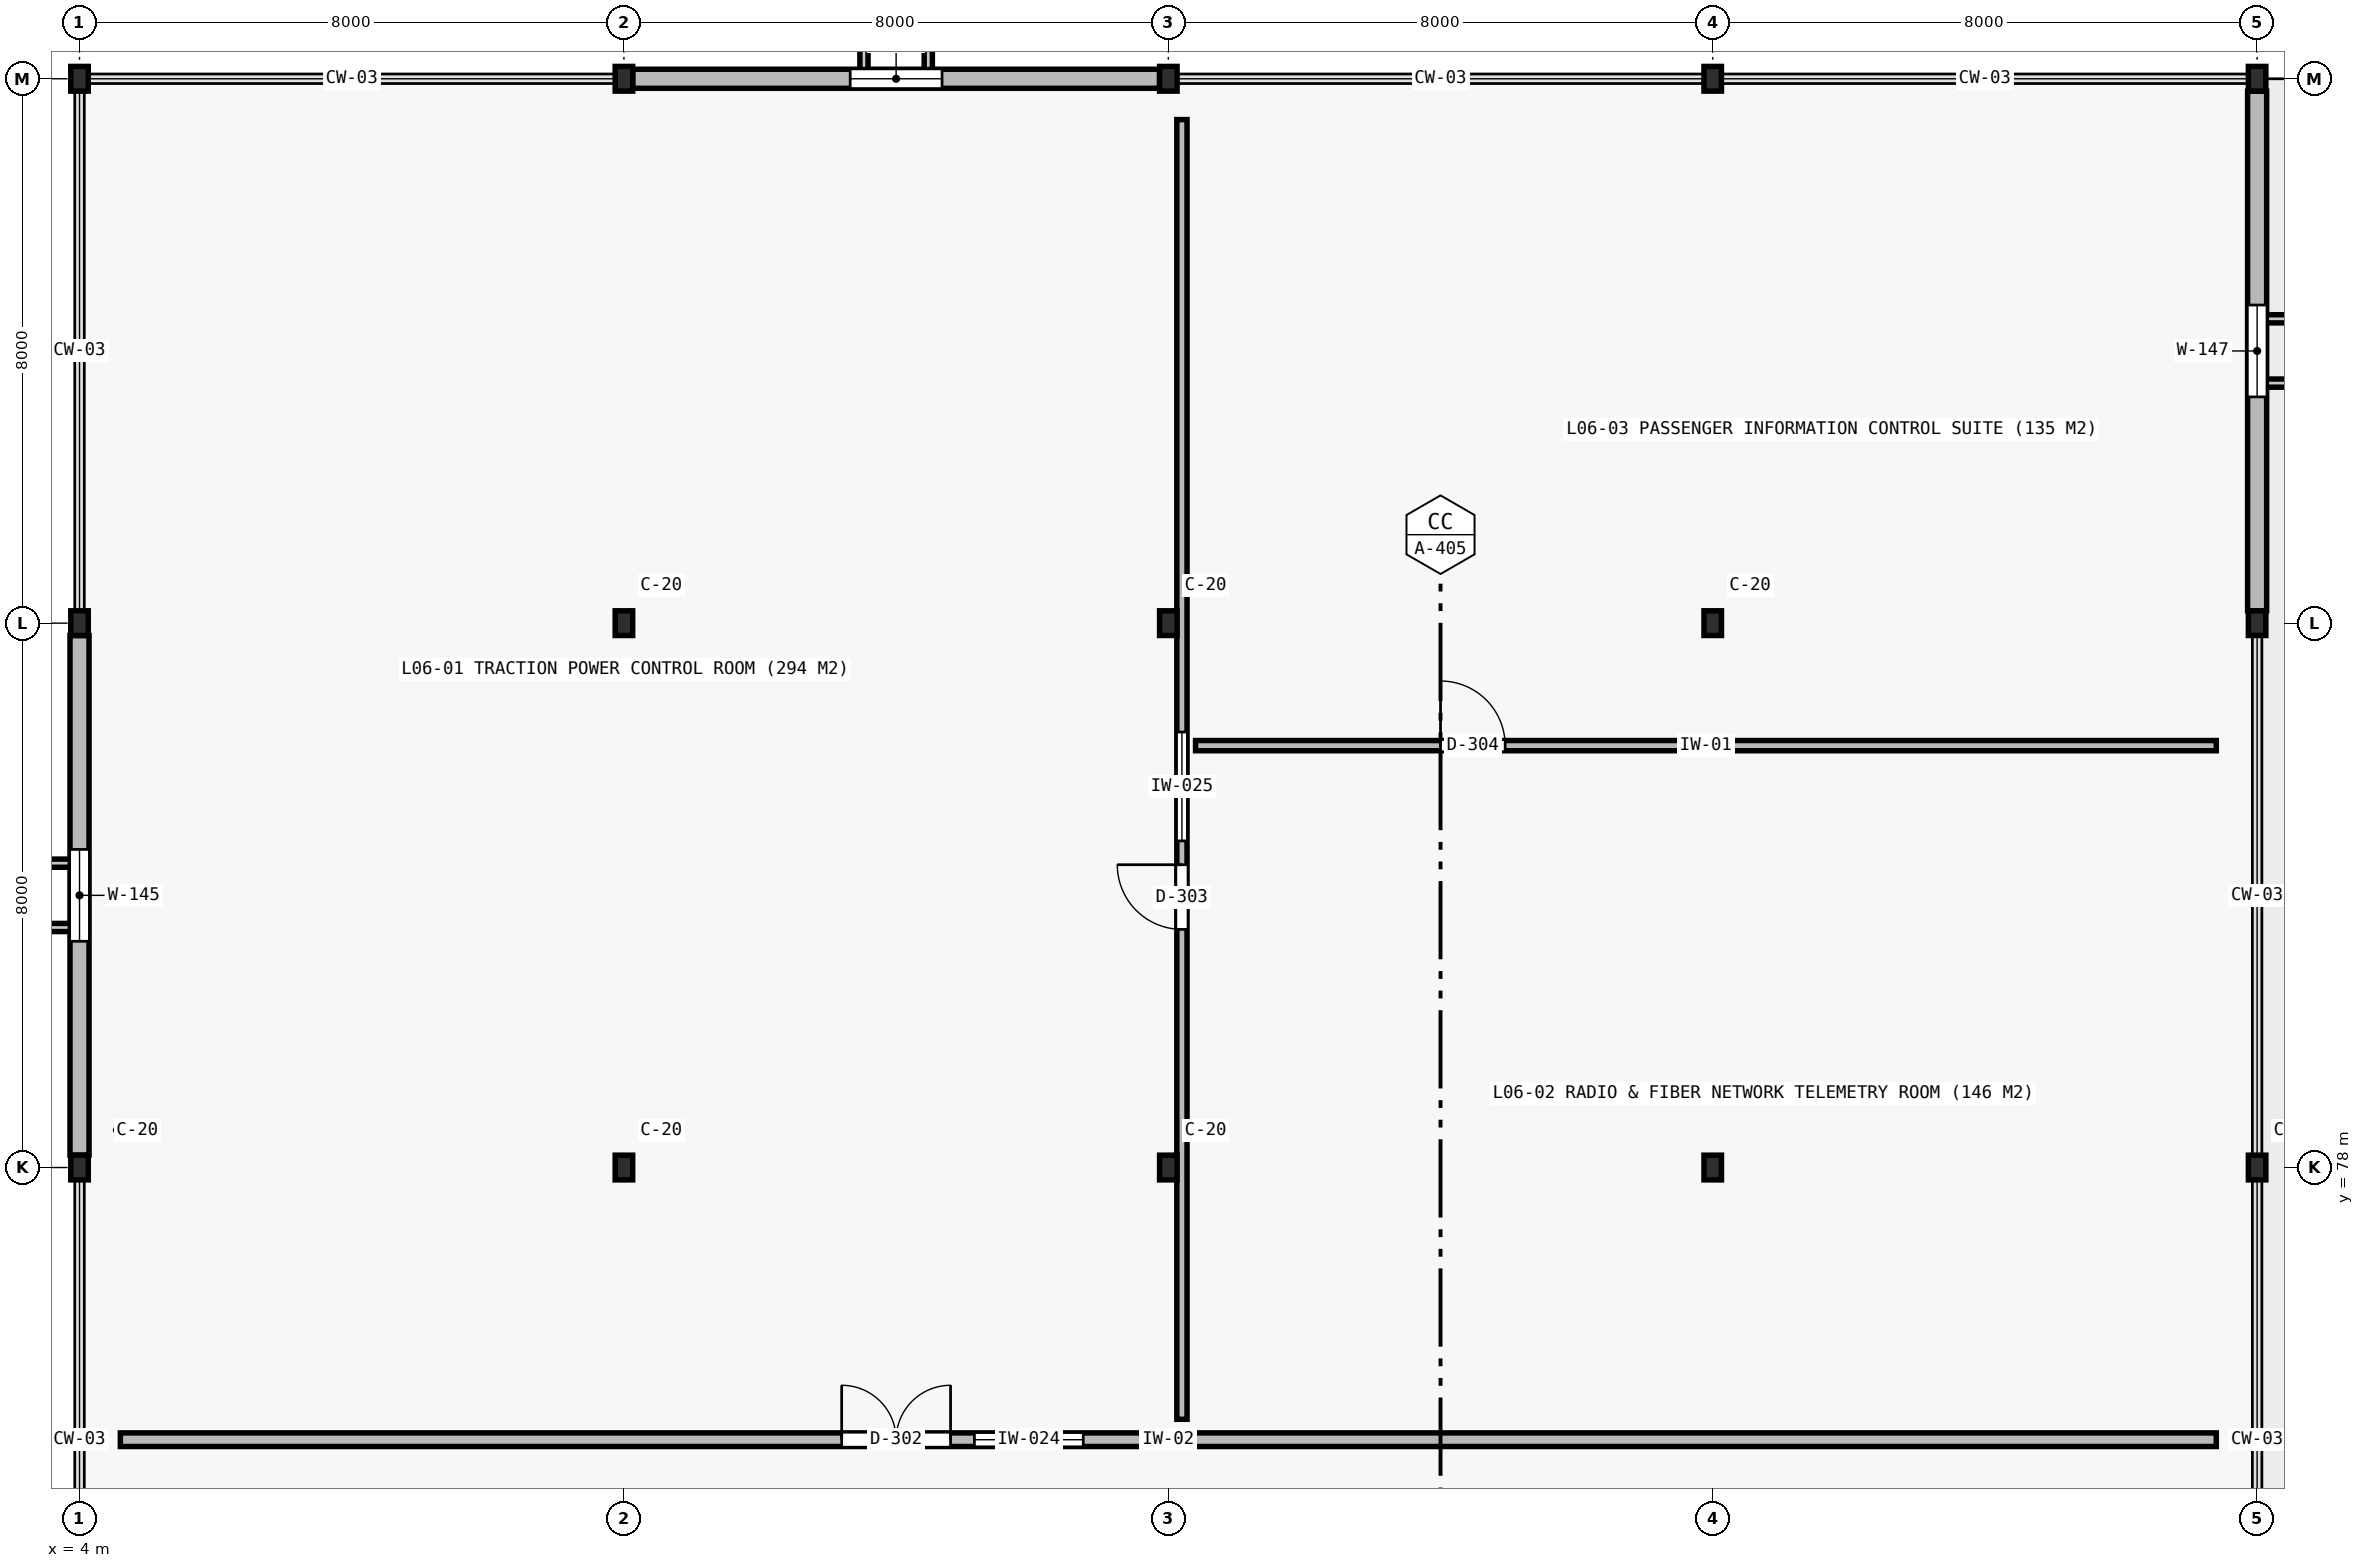
"""IFC4 building model, lengths in metres.
Left out: names, types, materials, properties, quantities, classifications, styles, units other than length and angle.
Written with IfcOpenShell. Run it as: python <this file> out.ifc"""

import sys

from ifc_helpers import new_model, si_unit, direction, frame, frame_2d, origin, origin_2d, place, context, subcontext, project, spatial, rectangle, i_section, extrude, element, fill, save


model = new_model("IFC4")
c1 = context("Model", 3, precision=1e-05, world=origin(), true_north=direction((0.0, 1.0)))
c2 = subcontext(c1, "Body", "Model", "MODEL_VIEW")
j1 = project(units=[si_unit("LENGTHUNIT", "METRE"), si_unit("PLANEANGLEUNIT", "RADIAN")], contexts=[c1])
p1 = place(None, origin())
s1 = spatial("IfcSite", under=j1, at=p1, CompositionType="ELEMENT")
p2 = place(p1, origin())
s2 = spatial("IfcBuilding", under=s1, at=p2, CompositionType="ELEMENT")
p3 = place(p2, frame((0.0, 0.0, 28.0)))
s3 = spatial("IfcBuildingStorey", under=s2, at=p3, CompositionType="ELEMENT", Elevation=28.0)
for number, where, z_axis, x_axis in (
    (1, (4.0, 78.0, 0.0), (0.0, 0.0, 1.0), (1.0, 0.0, 0.0)),
    (2, (4.0, 86.0, 0.0), (0.0, 0.0, 1.0), (1.0, 0.0, 0.0)),
    (3, (4.0, 94.0, 0.0), (0.0, 0.0, 1.0), (1.0, 0.0, 0.0)),
    (4, (12.0, 78.0, 0.0), (0.0, 0.0, 1.0), (1.0, 0.0, 0.0)),
    (5, (12.0, 86.0, 0.0), (0.0, 0.0, 1.0), (1.0, 0.0, 0.0)),
    (6, (12.0, 94.0, 0.0), (0.0, 0.0, 1.0), (1.0, 0.0, 0.0)),
    (7, (20.0, 78.0, 0.0), (0.0, 0.0, 1.0), (1.0, 0.0, 0.0)),
    (8, (20.0, 86.0, 0.0), (0.0, 0.0, 1.0), (1.0, 0.0, 0.0)),
    (9, (20.0, 94.0, 0.0), (0.0, 0.0, 1.0), (1.0, 0.0, 0.0)),
    (10, (28.0, 78.0, 0.0), (0.0, 0.0, 1.0), (1.0, 0.0, 0.0)),
    (11, (28.0, 86.0, 0.0), (0.0, 0.0, 1.0), (1.0, 0.0, 0.0)),
    (12, (28.0, 94.0, 0.0), (0.0, 0.0, 1.0), (1.0, 0.0, 0.0)),
    (13, (36.0, 78.0, 0.0), (0.0, 0.0, 1.0), (1.0, 0.0, 0.0)),
    (14, (36.0, 86.0, 0.0), (0.0, 0.0, 1.0), (1.0, 0.0, 0.0)),
    (15, (36.0, 94.0, 0.0), (0.0, 0.0, 1.0), (1.0, 0.0, 0.0)),
):
    element("IfcColumn", number, at=place(p3, frame(where, z_axis=z_axis, x_axis=x_axis)), inside=s3, PredefinedType="COLUMN", context=c2, shape_type="SweptSolid", body=[
        extrude(i_section(OverallWidth=0.257, OverallDepth=0.363, WebThickness=0.013, FlangeThickness=0.022, at=origin_2d()), origin(), (0.0, 0.0, 1.0), 3.98),
    ])
p4 = place(p3, frame((4.0, 78.181, 0.0), z_axis=(0.0, 0.0, 1.0), x_axis=(0.0, 1.0, 0.0)))
e16 = element("IfcWall", 16, at=p4, inside=s3, PredefinedType="STANDARD", context=c2, shape_type="SweptSolid", body=[
    extrude(rectangle(XDim=7.637, YDim=0.28, at=frame_2d((3.819, 0.0))), origin(), (0.0, 0.0, 1.0), 3.52),
])
p5 = place(p4, frame((3.144, 0.0, 0.95)))
e17 = element("IfcOpeningElement", 17, at=p5, cuts=e16, PredefinedType="OPENING", context=c2, shape_type="SweptSolid", body=[
    extrude(rectangle(XDim=1.35, YDim=2.05, at=frame_2d((0.675, 1.025))), frame((0.0, 0.15, 0.0), z_axis=(0.0, -1.0, 0.0), x_axis=(1.0, 0.0, 0.0)), (0.0, 0.0, 1.0), 0.3),
])
p6 = place(p3, frame((12.128, 94.0, 0.0), z_axis=(0.0, 0.0, 1.0), x_axis=(1.0, 0.0, 0.0)))
e18 = element("IfcWall", 18, at=p6, inside=s3, PredefinedType="STANDARD", context=c2, shape_type="SweptSolid", body=[
    extrude(rectangle(XDim=7.743, YDim=0.28, at=frame_2d((3.872, 0.0))), origin(), (0.0, 0.0, 1.0), 3.52),
])
p7 = place(p6, frame((3.197, 0.0, 0.95)))
e19 = element("IfcOpeningElement", 19, at=p7, cuts=e18, PredefinedType="OPENING", context=c2, shape_type="SweptSolid", body=[
    extrude(rectangle(XDim=1.35, YDim=2.05, at=frame_2d((0.675, 1.025))), frame((0.0, 0.15, 0.0), z_axis=(0.0, -1.0, 0.0), x_axis=(1.0, 0.0, 0.0)), (0.0, 0.0, 1.0), 0.3),
])
p8 = place(p3, frame((36.0, 93.819, 0.0), z_axis=(0.0, 0.0, 1.0), x_axis=(0.0, -1.0, 0.0)))
e20 = element("IfcWall", 20, at=p8, inside=s3, PredefinedType="STANDARD", context=c2, shape_type="SweptSolid", body=[
    extrude(rectangle(XDim=7.637, YDim=0.28, at=frame_2d((3.819, 0.0))), origin(), (0.0, 0.0, 1.0), 3.52),
])
p9 = place(p8, frame((3.144, 0.0, 0.95)))
e21 = element("IfcOpeningElement", 21, at=p9, cuts=e20, PredefinedType="OPENING", context=c2, shape_type="SweptSolid", body=[
    extrude(rectangle(XDim=1.35, YDim=2.05, at=frame_2d((0.675, 1.025))), frame((0.0, 0.15, 0.0), z_axis=(0.0, -1.0, 0.0), x_axis=(1.0, 0.0, 0.0)), (0.0, 0.0, 1.0), 0.3),
])
p10 = place(p3, frame((4.6, 74.0, 0.0), z_axis=(0.0, 0.0, 1.0), x_axis=(1.0, 0.0, 0.0)))
e22 = element("IfcWall", 22, at=p10, inside=s3, PredefinedType="PARTITIONING", context=c2, shape_type="SweptSolid", body=[
    extrude(rectangle(XDim=30.8, YDim=0.2, at=frame_2d((15.4, 0.0))), origin(), (0.0, 0.0, 1.0), 3.98),
])
p11 = place(p10, frame((10.6, 0.0, 0.0)))
e23 = element("IfcOpeningElement", 23, at=p11, cuts=e22, PredefinedType="OPENING", context=c2, shape_type="SweptSolid", body=[
    extrude(rectangle(XDim=1.6, YDim=2.2, at=frame_2d((0.8, 1.1))), frame((0.0, 0.11, 0.0), z_axis=(0.0, -1.0, 0.0), x_axis=(1.0, 0.0, 0.0)), (0.0, 0.0, 1.0), 0.22),
])
p12 = place(p10, frame((12.55, 0.0, 0.95)))
e24 = element("IfcOpeningElement", 24, at=p12, cuts=e22, PredefinedType="OPENING", context=c2, shape_type="SweptSolid", body=[
    extrude(rectangle(XDim=1.6, YDim=1.3, at=frame_2d((0.8, 0.65))), frame((0.0, 0.11, 0.0), z_axis=(0.0, -1.0, 0.0), x_axis=(1.0, 0.0, 0.0)), (0.0, 0.0, 1.0), 0.22),
])
p13 = place(p3, frame((20.2, 74.3, 0.0), z_axis=(0.0, 0.0, 1.0), x_axis=(0.0, 1.0, 0.0)))
e25 = element("IfcWall", 25, at=p13, inside=s3, PredefinedType="PARTITIONING", context=c2, shape_type="SweptSolid", body=[
    extrude(rectangle(XDim=19.1, YDim=0.15, at=frame_2d((9.55, 0.0))), origin(), (0.0, 0.0, 1.0), 3.98),
])
p14 = place(p13, frame((7.2, 0.0, 0.0)))
e26 = element("IfcOpeningElement", 26, at=p14, cuts=e25, PredefinedType="OPENING", context=c2, shape_type="SweptSolid", body=[
    extrude(rectangle(XDim=0.95, YDim=2.1, at=frame_2d((0.475, 1.05))), frame((0.0, 0.085, 0.0), z_axis=(0.0, -1.0, 0.0), x_axis=(1.0, 0.0, 0.0)), (0.0, 0.0, 1.0), 0.17),
])
p15 = place(p13, frame((8.5, 0.0, 0.95)))
e27 = element("IfcOpeningElement", 27, at=p15, cuts=e25, PredefinedType="OPENING", context=c2, shape_type="SweptSolid", body=[
    extrude(rectangle(XDim=1.6, YDim=1.3, at=frame_2d((0.8, 0.65))), frame((0.0, 0.085, 0.0), z_axis=(0.0, -1.0, 0.0), x_axis=(1.0, 0.0, 0.0)), (0.0, 0.0, 1.0), 0.17),
])
p16 = place(p3, frame((20.4, 84.2, 0.0), z_axis=(0.0, 0.0, 1.0), x_axis=(1.0, 0.0, 0.0)))
e28 = element("IfcWall", 28, at=p16, inside=s3, PredefinedType="PARTITIONING", context=c2, shape_type="SweptSolid", body=[
    extrude(rectangle(XDim=15.0, YDim=0.15, at=frame_2d((7.5, 0.0))), origin(), (0.0, 0.0, 1.0), 3.98),
])
p17 = place(p16, frame((3.6, 0.0, 0.0)))
e29 = element("IfcOpeningElement", 29, at=p17, cuts=e28, PredefinedType="OPENING", context=c2, shape_type="SweptSolid", body=[
    extrude(rectangle(XDim=0.95, YDim=2.1, at=frame_2d((0.475, 1.05))), frame((0.0, 0.085, 0.0), z_axis=(0.0, -1.0, 0.0), x_axis=(1.0, 0.0, 0.0)), (0.0, 0.0, 1.0), 0.17),
])
p18 = place(p5, origin())
e30 = element("IfcWindow", 30, at=p18, inside=s3, PartitioningType="SINGLE_PANEL", PredefinedType="WINDOW", context=c2, shape_type="SweptSolid", body=[
    extrude(rectangle(XDim=1.35, YDim=2.05, at=frame_2d((0.675, 1.025))), frame((0.0, 0.03, 0.0), z_axis=(0.0, -1.0, 0.0), x_axis=(1.0, 0.0, 0.0)), (0.0, 0.0, 1.0), 0.06),
])
fill(e17, e30)
p19 = place(p7, origin())
e31 = element("IfcWindow", 31, at=p19, inside=s3, PartitioningType="SINGLE_PANEL", PredefinedType="WINDOW", context=c2, shape_type="SweptSolid", body=[
    extrude(rectangle(XDim=1.35, YDim=2.05, at=frame_2d((0.675, 1.025))), frame((0.0, 0.03, 0.0), z_axis=(0.0, -1.0, 0.0), x_axis=(1.0, 0.0, 0.0)), (0.0, 0.0, 1.0), 0.06),
])
fill(e19, e31)
p20 = place(p9, origin())
e32 = element("IfcWindow", 32, at=p20, inside=s3, PartitioningType="SINGLE_PANEL", PredefinedType="WINDOW", context=c2, shape_type="SweptSolid", body=[
    extrude(rectangle(XDim=1.35, YDim=2.05, at=frame_2d((0.675, 1.025))), frame((0.0, 0.03, 0.0), z_axis=(0.0, -1.0, 0.0), x_axis=(1.0, 0.0, 0.0)), (0.0, 0.0, 1.0), 0.06),
])
fill(e21, e32)
p21 = place(p11, origin())
e33 = element("IfcDoor", 33, at=p21, inside=s3, OperationType="DOUBLE_DOOR_SINGLE_SWING", PredefinedType="DOOR", context=c2, shape_type="SweptSolid", body=[
    extrude(rectangle(XDim=1.6, YDim=2.2, at=frame_2d((0.8, 1.1))), frame((0.0, 0.025, 0.0), z_axis=(0.0, -1.0, 0.0), x_axis=(1.0, 0.0, 0.0)), (0.0, 0.0, 1.0), 0.05),
])
fill(e23, e33)
p22 = place(p12, origin())
e34 = element("IfcWindow", 34, at=p22, inside=s3, PartitioningType="SINGLE_PANEL", PredefinedType="WINDOW", context=c2, shape_type="SweptSolid", body=[
    extrude(rectangle(XDim=1.6, YDim=1.3, at=frame_2d((0.8, 0.65))), frame((0.0, 0.03, 0.0), z_axis=(0.0, -1.0, 0.0), x_axis=(1.0, 0.0, 0.0)), (0.0, 0.0, 1.0), 0.06),
])
fill(e24, e34)
p23 = place(p14, origin())
e35 = element("IfcDoor", 35, at=p23, inside=s3, OperationType="SINGLE_SWING_RIGHT", PredefinedType="DOOR", context=c2, shape_type="SweptSolid", body=[
    extrude(rectangle(XDim=0.95, YDim=2.1, at=frame_2d((0.475, 1.05))), frame((0.0, 0.025, 0.0), z_axis=(0.0, -1.0, 0.0), x_axis=(1.0, 0.0, 0.0)), (0.0, 0.0, 1.0), 0.05),
])
fill(e26, e35)
p24 = place(p15, origin())
e36 = element("IfcWindow", 36, at=p24, inside=s3, PartitioningType="SINGLE_PANEL", PredefinedType="WINDOW", context=c2, shape_type="SweptSolid", body=[
    extrude(rectangle(XDim=1.6, YDim=1.3, at=frame_2d((0.8, 0.65))), frame((0.0, 0.03, 0.0), z_axis=(0.0, -1.0, 0.0), x_axis=(1.0, 0.0, 0.0)), (0.0, 0.0, 1.0), 0.06),
])
fill(e27, e36)
p25 = place(p17, origin())
e37 = element("IfcDoor", 37, at=p25, inside=s3, OperationType="SINGLE_SWING_LEFT", PredefinedType="DOOR", context=c2, shape_type="SweptSolid", body=[
    extrude(rectangle(XDim=0.95, YDim=2.1, at=frame_2d((0.475, 1.05))), frame((0.0, 0.025, 0.0), z_axis=(0.0, -1.0, 0.0), x_axis=(1.0, 0.0, 0.0)), (0.0, 0.0, 1.0), 0.05),
])
fill(e29, e37)
save(model, sys.argv[1])
